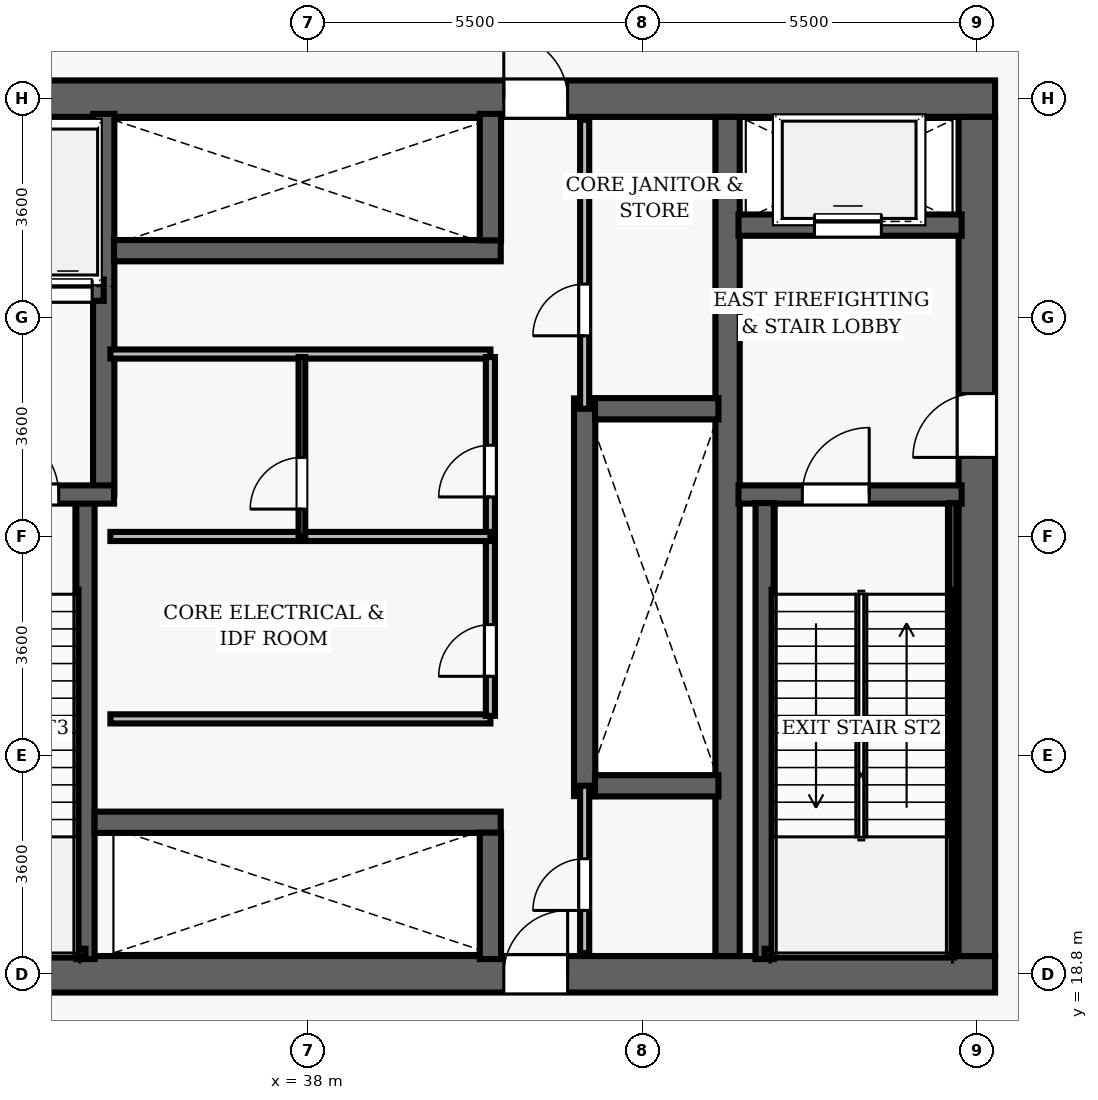
"""IFC4 building model, lengths in metres.
Left out: names, types, materials, properties, quantities, classifications, styles, units other than length and angle.
Written with IfcOpenShell. Run it as: python <this file> out.ifc"""

import sys

from ifc_helpers import new_model, si_unit, direction, frame, frame_2d, origin, place, context, subcontext, project, spatial, rectangle, extrude, element, fill, save


model = new_model("IFC4")
c1 = context("Model", 3, precision=1e-05, world=origin(), true_north=direction((0.0, 1.0)))
c2 = subcontext(c1, "Body", "Model", "MODEL_VIEW")
j1 = project(units=[si_unit("LENGTHUNIT", "METRE"), si_unit("PLANEANGLEUNIT", "RADIAN")], contexts=[c1])
p1 = place(None, origin())
s1 = spatial("IfcSite", under=j1, at=p1, CompositionType="ELEMENT")
p2 = place(p1, origin())
s2 = spatial("IfcBuilding", under=s1, at=p2, CompositionType="ELEMENT")
p3 = place(p2, frame((0.0, 0.0, 6.6)))
s3 = spatial("IfcBuildingStorey", under=s2, at=p3, CompositionType="ELEMENT", Elevation=6.6)
p4 = place(p3, frame((26.7, 18.8, 0.0), z_axis=(0.0, 0.0, 1.0), x_axis=(1.0, 0.0, 0.0)))
e1 = element("IfcWall", 1, at=p4, inside=s3, PredefinedType="SHEAR", context=c2, shape_type="SweptSolid", body=[
    extrude(rectangle(XDim=22.6, YDim=0.6, at=frame_2d((11.3, 0.0))), origin(), (0.0, 0.0, 1.0), 5.4),
])
p5 = place(p4, frame((14.52, 0.0, 0.0)))
e2 = element("IfcOpeningElement", 2, at=p5, cuts=e1, PredefinedType="OPENING", context=c2, shape_type="SweptSolid", body=[
    extrude(rectangle(XDim=1.05, YDim=2.15, at=frame_2d((0.525, 1.075))), frame((0.0, 0.31, 0.0), z_axis=(0.0, -1.0, 0.0), x_axis=(1.0, 0.0, 0.0)), (0.0, 0.0, 1.0), 0.62),
])
p6 = place(p3, frame((26.7, 33.2, 0.0), z_axis=(0.0, 0.0, 1.0), x_axis=(1.0, 0.0, 0.0)))
e3 = element("IfcWall", 3, at=p6, inside=s3, PredefinedType="SHEAR", context=c2, shape_type="SweptSolid", body=[
    extrude(rectangle(XDim=22.6, YDim=0.6, at=frame_2d((11.3, 0.0))), origin(), (0.0, 0.0, 1.0), 5.4),
])
p7 = place(p6, frame((4.62, 0.0, 0.0)))
e4 = element("IfcOpeningElement", 4, at=p7, cuts=e3, PredefinedType="OPENING", context=c2, shape_type="SweptSolid", body=[
    extrude(rectangle(XDim=1.05, YDim=2.15, at=frame_2d((0.525, 1.075))), frame((0.0, 0.31, 0.0), z_axis=(0.0, -1.0, 0.0), x_axis=(1.0, 0.0, 0.0)), (0.0, 0.0, 1.0), 0.62),
])
p8 = place(p6, frame((14.52, 0.0, 0.0)))
e5 = element("IfcOpeningElement", 5, at=p8, cuts=e3, PredefinedType="OPENING", context=c2, shape_type="SweptSolid", body=[
    extrude(rectangle(XDim=1.05, YDim=2.15, at=frame_2d((0.525, 1.075))), frame((0.0, 0.31, 0.0), z_axis=(0.0, -1.0, 0.0), x_axis=(1.0, 0.0, 0.0)), (0.0, 0.0, 1.0), 0.62),
])
p9 = place(p3, frame((49.0, 19.1, 0.0), z_axis=(0.0, 0.0, 1.0), x_axis=(0.0, 1.0, 0.0)))
e6 = element("IfcWall", 6, at=p9, inside=s3, PredefinedType="SHEAR", context=c2, shape_type="SweptSolid", body=[
    extrude(rectangle(XDim=13.8, YDim=0.6, at=frame_2d((6.9, 0.0))), origin(), (0.0, 0.0, 1.0), 5.4),
])
p10 = place(p9, frame((8.2, 0.0, 0.0)))
e7 = element("IfcOpeningElement", 7, at=p10, cuts=e6, PredefinedType="OPENING", context=c2, shape_type="SweptSolid", body=[
    extrude(rectangle(XDim=1.05, YDim=2.15, at=frame_2d((0.525, 1.075))), frame((0.0, 0.31, 0.0), z_axis=(0.0, -1.0, 0.0), x_axis=(1.0, 0.0, 0.0)), (0.0, 0.0, 1.0), 0.62),
])
p11 = place(p3, frame((44.9, 19.1, 0.0), z_axis=(0.0, 0.0, 1.0), x_axis=(0.0, 1.0, 0.0)))
e8 = element("IfcWall", 8, at=p11, inside=s3, PredefinedType="SHEAR", context=c2, shape_type="SweptSolid", body=[
    extrude(rectangle(XDim=13.8, YDim=0.4, at=frame_2d((6.9, 0.0))), origin(), (0.0, 0.0, 1.0), 5.4),
])
p12 = place(p3, frame((45.08, 26.69, 0.0), z_axis=(0.0, 0.0, 1.0), x_axis=(1.0, 0.0, 0.0)))
e9 = element("IfcWall", 9, at=p12, inside=s3, PredefinedType="SHEAR", context=c2, shape_type="SweptSolid", body=[
    extrude(rectangle(XDim=3.67, YDim=0.3, at=frame_2d((1.835, 0.0))), origin(), (0.0, 0.0, 1.0), 5.4),
])
p13 = place(p12, frame((1.05, 0.0, 0.0)))
e10 = element("IfcOpeningElement", 10, at=p13, cuts=e9, PredefinedType="OPENING", context=c2, shape_type="SweptSolid", body=[
    extrude(rectangle(XDim=1.1, YDim=2.15, at=frame_2d((0.55, 1.075))), frame((0.0, 0.16, 0.0), z_axis=(0.0, -1.0, 0.0), x_axis=(1.0, 0.0, 0.0)), (0.0, 0.0, 1.0), 0.32),
])
p14 = place(p3, frame((45.51, 19.05, 0.0), z_axis=(0.0, 0.0, 1.0), x_axis=(0.0, 1.0, 0.0)))
e11 = element("IfcWall", 11, at=p14, inside=s3, PredefinedType="SHEAR", context=c2, shape_type="SweptSolid", body=[
    extrude(rectangle(XDim=7.5, YDim=0.3, at=frame_2d((3.75, 0.0))), origin(), (0.0, 0.0, 1.0), 5.4),
])
p15 = place(p3, frame((48.605, 19.1, 0.0), z_axis=(0.0, 0.0, 1.0), x_axis=(0.0, 1.0, 0.0)))
e12 = element("IfcWall", 12, at=p15, inside=s3, PredefinedType="SHEAR", context=c2, shape_type="SweptSolid", body=[
    extrude(rectangle(XDim=7.45, YDim=0.12, at=frame_2d((3.725, 0.0))), origin(), (0.0, 0.0, 1.0), 5.4),
])
p16 = place(p3, frame((45.51, 19.16, 0.0), z_axis=(0.0, 0.0, 1.0), x_axis=(1.0, 0.0, 0.0)))
e13 = element("IfcWall", 13, at=p16, inside=s3, PredefinedType="SHEAR", context=c2, shape_type="SweptSolid", body=[
    extrude(rectangle(XDim=3.095, YDim=0.12, at=frame_2d((1.547, 0.0))), origin(), (0.0, 0.0, 1.0), 5.4),
])
p17 = place(p3, frame((45.08, 31.12, 0.0), z_axis=(0.0, 0.0, 1.0), x_axis=(1.0, 0.0, 0.0)))
e14 = element("IfcWall", 14, at=p17, inside=s3, PredefinedType="SHEAR", context=c2, shape_type="SweptSolid", body=[
    extrude(rectangle(XDim=3.67, YDim=0.35, at=frame_2d((1.835, 0.0))), origin(), (0.0, 0.0, 1.0), 4.11),
])
p18 = place(p17, frame((1.25, 0.0, 0.0)))
e15 = element("IfcOpeningElement", 15, at=p18, cuts=e14, PredefinedType="OPENING", context=c2, shape_type="SweptSolid", body=[
    extrude(rectangle(XDim=1.1, YDim=2.15, at=frame_2d((0.55, 1.075))), frame((0.0, 0.185, 0.0), z_axis=(0.0, -1.0, 0.0), x_axis=(1.0, 0.0, 0.0)), (0.0, 0.0, 1.0), 0.37),
])
p19 = place(p3, frame((34.34, 19.05, 0.0), z_axis=(0.0, 0.0, 1.0), x_axis=(0.0, 1.0, 0.0)))
e16 = element("IfcWall", 16, at=p19, inside=s3, PredefinedType="SHEAR", context=c2, shape_type="SweptSolid", body=[
    extrude(rectangle(XDim=7.5, YDim=0.3, at=frame_2d((3.75, 0.0))), origin(), (0.0, 0.0, 1.0), 5.4),
])
p20 = place(p3, frame((34.64, 26.69, 0.0), z_axis=(0.0, 0.0, 1.0), x_axis=(0.0, 1.0, 0.0)))
e17 = element("IfcWall", 17, at=p20, inside=s3, PredefinedType="SHEAR", context=c2, shape_type="SweptSolid", body=[
    extrude(rectangle(XDim=6.26, YDim=0.35, at=frame_2d((3.13, 0.0))), origin(), (0.0, 0.0, 1.0), 5.4),
])
p21 = place(p3, frame((31.25, 26.69, 0.0), z_axis=(0.0, 0.0, 1.0), x_axis=(1.0, 0.0, 0.0)))
e18 = element("IfcWall", 18, at=p21, inside=s3, PredefinedType="SHEAR", context=c2, shape_type="SweptSolid", body=[
    extrude(rectangle(XDim=3.56, YDim=0.3, at=frame_2d((1.78, 0.0))), origin(), (0.0, 0.0, 1.0), 5.4),
])
p22 = place(p21, frame((1.55, 0.0, 0.0)))
e19 = element("IfcOpeningElement", 19, at=p22, cuts=e18, PredefinedType="OPENING", context=c2, shape_type="SweptSolid", body=[
    extrude(rectangle(XDim=1.1, YDim=2.15, at=frame_2d((0.55, 1.075))), frame((0.0, 0.16, 0.0), z_axis=(0.0, -1.0, 0.0), x_axis=(1.0, 0.0, 0.0)), (0.0, 0.0, 1.0), 0.32),
])
p23 = place(p3, frame((31.3, 19.16, 0.0), z_axis=(0.0, 0.0, 1.0), x_axis=(1.0, 0.0, 0.0)))
e20 = element("IfcWall", 20, at=p23, inside=s3, PredefinedType="SHEAR", context=c2, shape_type="SweptSolid", body=[
    extrude(rectangle(XDim=3.04, YDim=0.12, at=frame_2d((1.52, 0.0))), origin(), (0.0, 0.0, 1.0), 5.4),
])
p24 = place(p3, frame((32.23, 30.05, 0.0), z_axis=(0.0, 0.0, 1.0), x_axis=(1.0, 0.0, 0.0)))
e21 = element("IfcWall", 21, at=p24, inside=s3, PredefinedType="SHEAR", context=c2, shape_type="SweptSolid", body=[
    extrude(rectangle(XDim=2.41, YDim=0.35, at=frame_2d((1.205, 0.0))), origin(), (0.0, 0.0, 1.0), 4.11),
])
p25 = place(p24, frame((0.42, 0.0, 0.0)))
e22 = element("IfcOpeningElement", 22, at=p25, cuts=e21, PredefinedType="OPENING", context=c2, shape_type="SweptSolid", body=[
    extrude(rectangle(XDim=0.8, YDim=2.15, at=frame_2d((0.4, 1.075))), frame((0.0, 0.185, 0.0), z_axis=(0.0, -1.0, 0.0), x_axis=(1.0, 0.0, 0.0)), (0.0, 0.0, 1.0), 0.37),
])
p26 = place(p24, frame((1.42, 0.0, 0.0)))
e23 = element("IfcOpeningElement", 23, at=p26, cuts=e21, PredefinedType="OPENING", context=c2, shape_type="SweptSolid", body=[
    extrude(rectangle(XDim=0.8, YDim=2.15, at=frame_2d((0.4, 1.075))), frame((0.0, 0.185, 0.0), z_axis=(0.0, -1.0, 0.0), x_axis=(1.0, 0.0, 0.0)), (0.0, 0.0, 1.0), 0.37),
])
p27 = place(p3, frame((42.55, 21.73, 0.0), z_axis=(0.0, 0.0, 1.0), x_axis=(0.0, 1.0, 0.0)))
e24 = element("IfcWall", 24, at=p27, inside=s3, PredefinedType="SHEAR", context=c2, shape_type="SweptSolid", body=[
    extrude(rectangle(XDim=6.54, YDim=0.35, at=frame_2d((3.27, 0.0))), origin(), (0.0, 0.0, 1.0), 4.11),
])
for number, where, z_axis, x_axis in (
    (25, (42.72, 21.9, 0.0), (0.0, 0.0, 1.0), (1.0, 0.0, 0.0)),
    (26, (42.72, 28.1, 0.0), (0.0, 0.0, 1.0), (1.0, 0.0, 0.0)),
):
    element("IfcWall", number, at=place(p3, frame(where, z_axis=z_axis, x_axis=x_axis)), inside=s3, PredefinedType="SHEAR", context=c2, shape_type="SweptSolid", body=[
        extrude(rectangle(XDim=2.03, YDim=0.35, at=frame_2d((1.015, 0.0))), origin(), (0.0, 0.0, 1.0), 4.11),
    ])
p28 = place(p3, frame((34.81, 30.7, 0.0), z_axis=(0.0, 0.0, 1.0), x_axis=(1.0, 0.0, 0.0)))
e27 = element("IfcWall", 27, at=p28, inside=s3, PredefinedType="SHEAR", context=c2, shape_type="SweptSolid", body=[
    extrude(rectangle(XDim=6.36, YDim=0.35, at=frame_2d((3.18, 0.0))), origin(), (0.0, 0.0, 1.0), 4.11),
])
p29 = place(p3, frame((41.0, 30.87, 0.0), z_axis=(0.0, 0.0, 1.0), x_axis=(0.0, 1.0, 0.0)))
e28 = element("IfcWall", 28, at=p29, inside=s3, PredefinedType="SHEAR", context=c2, shape_type="SweptSolid", body=[
    extrude(rectangle(XDim=2.08, YDim=0.35, at=frame_2d((1.04, 0.0))), origin(), (0.0, 0.0, 1.0), 4.11),
])
p30 = place(p3, frame((34.49, 21.3, 0.0), z_axis=(0.0, 0.0, 1.0), x_axis=(1.0, 0.0, 0.0)))
e29 = element("IfcWall", 29, at=p30, inside=s3, PredefinedType="SHEAR", context=c2, shape_type="SweptSolid", body=[
    extrude(rectangle(XDim=6.68, YDim=0.35, at=frame_2d((3.34, 0.0))), origin(), (0.0, 0.0, 1.0), 4.11),
])
p31 = place(p3, frame((41.0, 19.05, 0.0), z_axis=(0.0, 0.0, 1.0), x_axis=(0.0, 1.0, 0.0)))
e30 = element("IfcWall", 30, at=p31, inside=s3, PredefinedType="SHEAR", context=c2, shape_type="SweptSolid", body=[
    extrude(rectangle(XDim=2.08, YDim=0.35, at=frame_2d((1.04, 0.0))), origin(), (0.0, 0.0, 1.0), 4.11),
])
for number, where, z_axis, x_axis in (
    (31, (34.75, 29.0, 0.0), (0.0, 0.0, 1.0), (1.0, 0.0, 0.0)),
    (32, (34.75, 23.0, 0.0), (0.0, 0.0, 1.0), (1.0, 0.0, 0.0)),
):
    element("IfcWall", number, at=place(p3, frame(where, z_axis=z_axis, x_axis=x_axis)), inside=s3, PredefinedType="PARTITIONING", context=c2, shape_type="SweptSolid", body=[
        extrude(rectangle(XDim=6.25, YDim=0.15, at=frame_2d((3.125, 0.0))), origin(), (0.0, 0.0, 1.0), 4.11),
    ])
p32 = place(p3, frame((41.0, 23.05, 0.0), z_axis=(0.0, 0.0, 1.0), x_axis=(0.0, 1.0, 0.0)))
e33 = element("IfcWall", 33, at=p32, inside=s3, PredefinedType="PARTITIONING", context=c2, shape_type="SweptSolid", body=[
    extrude(rectangle(XDim=5.9, YDim=0.15, at=frame_2d((2.95, 0.0))), origin(), (0.0, 0.0, 1.0), 4.11),
])
p33 = place(p32, frame((0.65, 0.0, 0.0)))
e34 = element("IfcOpeningElement", 34, at=p33, cuts=e33, PredefinedType="OPENING", context=c2, shape_type="SweptSolid", body=[
    extrude(rectangle(XDim=0.85, YDim=2.1, at=frame_2d((0.425, 1.05))), frame((0.0, 0.085, 0.0), z_axis=(0.0, -1.0, 0.0), x_axis=(1.0, 0.0, 0.0)), (0.0, 0.0, 1.0), 0.17),
])
p34 = place(p32, frame((3.6, 0.0, 0.0)))
e35 = element("IfcOpeningElement", 35, at=p34, cuts=e33, PredefinedType="OPENING", context=c2, shape_type="SweptSolid", body=[
    extrude(rectangle(XDim=0.85, YDim=2.1, at=frame_2d((0.425, 1.05))), frame((0.0, 0.085, 0.0), z_axis=(0.0, -1.0, 0.0), x_axis=(1.0, 0.0, 0.0)), (0.0, 0.0, 1.0), 0.17),
])
p35 = place(p3, frame((34.75, 26.0, 0.0), z_axis=(0.0, 0.0, 1.0), x_axis=(1.0, 0.0, 0.0)))
e36 = element("IfcWall", 36, at=p35, inside=s3, PredefinedType="PARTITIONING", context=c2, shape_type="SweptSolid", body=[
    extrude(rectangle(XDim=6.25, YDim=0.15, at=frame_2d((3.125, 0.0))), origin(), (0.0, 0.0, 1.0), 4.11),
])
p36 = place(p3, frame((37.9, 26.0, 0.0), z_axis=(0.0, 0.0, 1.0), x_axis=(0.0, 1.0, 0.0)))
e37 = element("IfcWall", 37, at=p36, inside=s3, PredefinedType="PARTITIONING", context=c2, shape_type="SweptSolid", body=[
    extrude(rectangle(XDim=2.95, YDim=0.11, at=frame_2d((1.475, 0.0))), origin(), (0.0, 0.0, 1.0), 4.11),
])
p37 = place(p36, frame((0.45, 0.0, 0.0)))
e38 = element("IfcOpeningElement", 38, at=p37, cuts=e37, PredefinedType="OPENING", context=c2, shape_type="SweptSolid", body=[
    extrude(rectangle(XDim=0.85, YDim=2.1, at=frame_2d((0.425, 1.05))), frame((0.0, 0.065, 0.0), z_axis=(0.0, -1.0, 0.0), x_axis=(1.0, 0.0, 0.0)), (0.0, 0.0, 1.0), 0.13),
])
p38 = place(p3, frame((42.55, 28.1, 0.0), z_axis=(0.0, 0.0, 1.0), x_axis=(0.0, 1.0, 0.0)))
e39 = element("IfcWall", 39, at=p38, inside=s3, PredefinedType="PARTITIONING", context=c2, shape_type="SweptSolid", body=[
    extrude(rectangle(XDim=4.75, YDim=0.15, at=frame_2d((2.375, 0.0))), origin(), (0.0, 0.0, 1.0), 4.11),
])
p39 = place(p38, frame((1.2, 0.0, 0.0)))
e40 = element("IfcOpeningElement", 40, at=p39, cuts=e39, PredefinedType="OPENING", context=c2, shape_type="SweptSolid", body=[
    extrude(rectangle(XDim=0.85, YDim=2.1, at=frame_2d((0.425, 1.05))), frame((0.0, 0.085, 0.0), z_axis=(0.0, -1.0, 0.0), x_axis=(1.0, 0.0, 0.0)), (0.0, 0.0, 1.0), 0.17),
])
p40 = place(p3, frame((42.55, 19.15, 0.0), z_axis=(0.0, 0.0, 1.0), x_axis=(0.0, 1.0, 0.0)))
e41 = element("IfcWall", 41, at=p40, inside=s3, PredefinedType="PARTITIONING", context=c2, shape_type="SweptSolid", body=[
    extrude(rectangle(XDim=2.75, YDim=0.15, at=frame_2d((1.375, 0.0))), origin(), (0.0, 0.0, 1.0), 4.11),
])
p41 = place(p40, frame((0.7, 0.0, 0.0)))
e42 = element("IfcOpeningElement", 42, at=p41, cuts=e41, PredefinedType="OPENING", context=c2, shape_type="SweptSolid", body=[
    extrude(rectangle(XDim=0.85, YDim=2.1, at=frame_2d((0.425, 1.05))), frame((0.0, 0.085, 0.0), z_axis=(0.0, -1.0, 0.0), x_axis=(1.0, 0.0, 0.0)), (0.0, 0.0, 1.0), 0.17),
])
p42 = place(p13, origin())
e43 = element("IfcDoor", 43, at=p42, inside=s3, OperationType="SINGLE_SWING_RIGHT", PredefinedType="DOOR", context=c2, shape_type="SweptSolid", body=[
    extrude(rectangle(XDim=1.1, YDim=2.15, at=frame_2d((0.55, 1.075))), frame((0.0, 0.025, 0.0), z_axis=(0.0, -1.0, 0.0), x_axis=(1.0, 0.0, 0.0)), (0.0, 0.0, 1.0), 0.05),
])
fill(e10, e43)
p43 = place(p10, origin())
e44 = element("IfcDoor", 44, at=p43, inside=s3, OperationType="SINGLE_SWING_LEFT", PredefinedType="DOOR", context=c2, shape_type="SweptSolid", body=[
    extrude(rectangle(XDim=1.05, YDim=2.15, at=frame_2d((0.525, 1.075))), frame((0.0, 0.025, 0.0), z_axis=(0.0, -1.0, 0.0), x_axis=(1.0, 0.0, 0.0)), (0.0, 0.0, 1.0), 0.05),
])
fill(e7, e44)
p44 = place(p22, origin())
e45 = element("IfcDoor", 45, at=p44, inside=s3, OperationType="SINGLE_SWING_LEFT", PredefinedType="DOOR", context=c2, shape_type="SweptSolid", body=[
    extrude(rectangle(XDim=1.1, YDim=2.15, at=frame_2d((0.55, 1.075))), frame((0.0, 0.025, 0.0), z_axis=(0.0, -1.0, 0.0), x_axis=(1.0, 0.0, 0.0)), (0.0, 0.0, 1.0), 0.05),
])
fill(e19, e45)
p45 = place(p8, origin())
e46 = element("IfcDoor", 46, at=p45, inside=s3, OperationType="SINGLE_SWING_LEFT", PredefinedType="DOOR", context=c2, shape_type="SweptSolid", body=[
    extrude(rectangle(XDim=1.05, YDim=2.15, at=frame_2d((0.525, 1.075))), frame((0.0, 0.025, 0.0), z_axis=(0.0, -1.0, 0.0), x_axis=(1.0, 0.0, 0.0)), (0.0, 0.0, 1.0), 0.05),
])
fill(e5, e46)
p46 = place(p5, origin())
e47 = element("IfcDoor", 47, at=p46, inside=s3, OperationType="SINGLE_SWING_RIGHT", PredefinedType="DOOR", context=c2, shape_type="SweptSolid", body=[
    extrude(rectangle(XDim=1.05, YDim=2.15, at=frame_2d((0.525, 1.075))), frame((0.0, 0.025, 0.0), z_axis=(0.0, -1.0, 0.0), x_axis=(1.0, 0.0, 0.0)), (0.0, 0.0, 1.0), 0.05),
])
fill(e2, e47)
p47 = place(p33, origin())
e48 = element("IfcDoor", 48, at=p47, inside=s3, OperationType="SINGLE_SWING_LEFT", PredefinedType="DOOR", context=c2, shape_type="SweptSolid", body=[
    extrude(rectangle(XDim=0.85, YDim=2.1, at=frame_2d((0.425, 1.05))), frame((0.0, 0.025, 0.0), z_axis=(0.0, -1.0, 0.0), x_axis=(1.0, 0.0, 0.0)), (0.0, 0.0, 1.0), 0.05),
])
fill(e34, e48)
p48 = place(p34, origin())
e49 = element("IfcDoor", 49, at=p48, inside=s3, OperationType="SINGLE_SWING_LEFT", PredefinedType="DOOR", context=c2, shape_type="SweptSolid", body=[
    extrude(rectangle(XDim=0.85, YDim=2.1, at=frame_2d((0.425, 1.05))), frame((0.0, 0.025, 0.0), z_axis=(0.0, -1.0, 0.0), x_axis=(1.0, 0.0, 0.0)), (0.0, 0.0, 1.0), 0.05),
])
fill(e35, e49)
p49 = place(p37, origin())
e50 = element("IfcDoor", 50, at=p49, inside=s3, OperationType="SINGLE_SWING_LEFT", PredefinedType="DOOR", context=c2, shape_type="SweptSolid", body=[
    extrude(rectangle(XDim=0.85, YDim=2.1, at=frame_2d((0.425, 1.05))), frame((0.0, 0.025, 0.0), z_axis=(0.0, -1.0, 0.0), x_axis=(1.0, 0.0, 0.0)), (0.0, 0.0, 1.0), 0.05),
])
fill(e38, e50)
p50 = place(p39, origin())
e51 = element("IfcDoor", 51, at=p50, inside=s3, OperationType="SINGLE_SWING_LEFT", PredefinedType="DOOR", context=c2, shape_type="SweptSolid", body=[
    extrude(rectangle(XDim=0.85, YDim=2.1, at=frame_2d((0.425, 1.05))), frame((0.0, 0.025, 0.0), z_axis=(0.0, -1.0, 0.0), x_axis=(1.0, 0.0, 0.0)), (0.0, 0.0, 1.0), 0.05),
])
fill(e40, e51)
p51 = place(p41, origin())
e52 = element("IfcDoor", 52, at=p51, inside=s3, OperationType="SINGLE_SWING_LEFT", PredefinedType="DOOR", context=c2, shape_type="SweptSolid", body=[
    extrude(rectangle(XDim=0.85, YDim=2.1, at=frame_2d((0.425, 1.05))), frame((0.0, 0.025, 0.0), z_axis=(0.0, -1.0, 0.0), x_axis=(1.0, 0.0, 0.0)), (0.0, 0.0, 1.0), 0.05),
])
fill(e42, e52)
p52 = place(p18, origin())
e53 = element("IfcDoor", 53, at=p52, inside=s3, OperationType="SLIDING_TO_LEFT", PredefinedType="DOOR", context=c2, shape_type="SweptSolid", body=[
    extrude(rectangle(XDim=1.1, YDim=2.15, at=frame_2d((0.55, 1.075))), frame((0.0, 0.025, 0.0), z_axis=(0.0, -1.0, 0.0), x_axis=(1.0, 0.0, 0.0)), (0.0, 0.0, 1.0), 0.05),
])
fill(e15, e53)
p53 = place(p26, origin())
e54 = element("IfcDoor", 54, at=p53, inside=s3, OperationType="SLIDING_TO_LEFT", PredefinedType="DOOR", context=c2, shape_type="SweptSolid", body=[
    extrude(rectangle(XDim=0.8, YDim=2.15, at=frame_2d((0.4, 1.075))), frame((0.0, 0.025, 0.0), z_axis=(0.0, -1.0, 0.0), x_axis=(1.0, 0.0, 0.0)), (0.0, 0.0, 1.0), 0.05),
])
fill(e23, e54)
save(model, sys.argv[1])
